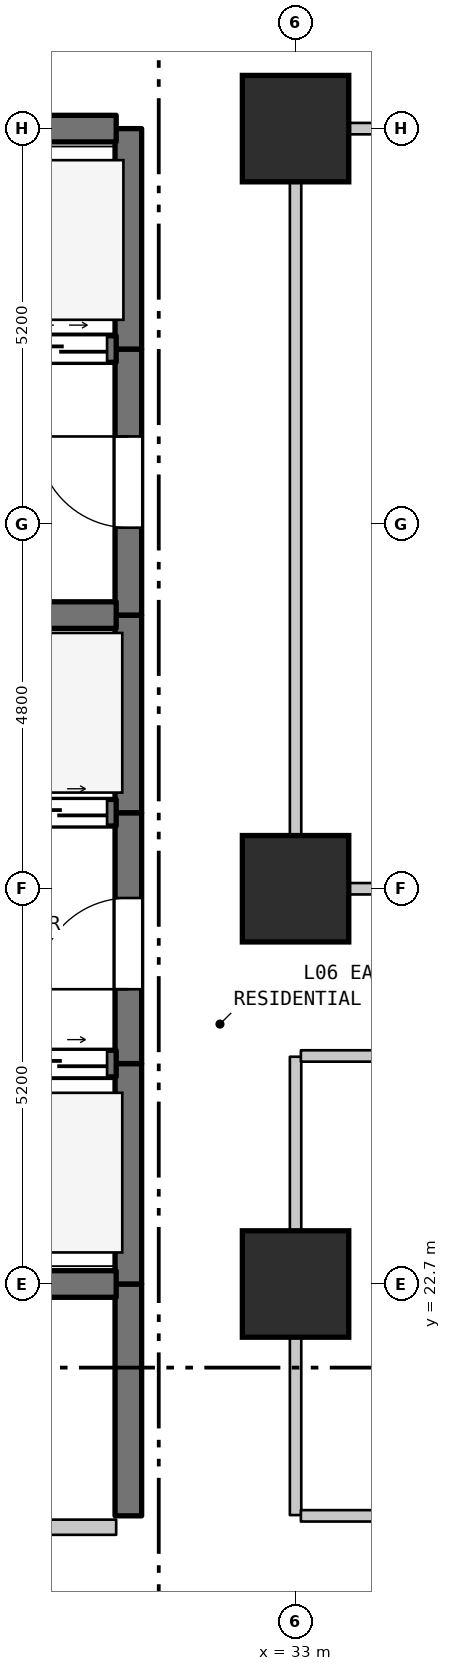
"""IFC4 building model, lengths in metres.
Left out: names, types, materials, properties, quantities, classifications, styles, units other than length and angle.
Written with IfcOpenShell. Run it as: python <this file> out.ifc"""

import sys

from ifc_helpers import new_model, si_unit, direction, frame, frame_2d, origin, origin_2d, place, context, subcontext, project, spatial, rectangle, extrude, element, fill, save


model = new_model("IFC4")
c1 = context("Model", 3, precision=1e-05, world=origin(), true_north=direction((0.0, 1.0)))
c2 = subcontext(c1, "Body", "Model", "MODEL_VIEW")
j1 = project(units=[si_unit("LENGTHUNIT", "METRE"), si_unit("PLANEANGLEUNIT", "RADIAN")], contexts=[c1])
p1 = place(None, origin())
s1 = spatial("IfcSite", under=j1, at=p1, CompositionType="ELEMENT")
p2 = place(p1, origin())
s2 = spatial("IfcBuilding", under=s1, at=p2, CompositionType="ELEMENT")
p3 = place(p2, frame((0.0, 0.0, 31.4)))
s3 = spatial("IfcBuildingStorey", under=s2, at=p3, CompositionType="ELEMENT", Elevation=31.4)
for number, where, z_axis, x_axis in (
    (1, (33.0, 22.7, 0.0), (0.0, 0.0, 1.0), (1.0, 0.0, 0.0)),
    (2, (33.0, 27.9, 0.0), (0.0, 0.0, 1.0), (1.0, 0.0, 0.0)),
    (3, (33.0, 37.9, 0.0), (0.0, 0.0, 1.0), (1.0, 0.0, 0.0)),
):
    element("IfcColumn", number, at=place(p3, frame(where, z_axis=z_axis, x_axis=x_axis)), inside=s3, PredefinedType="COLUMN", context=c2, shape_type="SweptSolid", body=[
        extrude(rectangle(XDim=1.4, YDim=1.4, at=origin_2d()), origin(), (0.0, 0.0, 1.0), 3.7),
    ])
p4 = place(p3, frame((30.8, 19.65, 0.0), z_axis=(0.0, 0.0, 1.0), x_axis=(0.0, 1.0, 0.0)))
e4 = element("IfcWall", 4, at=p4, inside=s3, PredefinedType="SHEAR", context=c2, shape_type="SweptSolid", body=[
    extrude(rectangle(XDim=3.05, YDim=0.35, at=frame_2d((1.525, 0.0))), origin(), (0.0, 0.0, 1.0), 3.385),
])
p5 = place(p3, frame((30.8, 22.7, 0.0), z_axis=(0.0, 0.0, 1.0), x_axis=(0.0, 1.0, 0.0)))
e5 = element("IfcWall", 5, at=p5, inside=s3, PredefinedType="SHEAR", context=c2, shape_type="SweptSolid", body=[
    extrude(rectangle(XDim=2.9, YDim=0.35, at=frame_2d((1.45, 0.0))), origin(), (0.0, 0.0, 1.0), 3.385),
])
p6 = place(p3, frame((30.8, 25.6, 0.0), z_axis=(0.0, 0.0, 1.0), x_axis=(0.0, 1.0, 0.0)))
e6 = element("IfcWall", 6, at=p6, inside=s3, PredefinedType="SHEAR", context=c2, shape_type="SweptSolid", body=[
    extrude(rectangle(XDim=3.3, YDim=0.35, at=frame_2d((1.65, 0.0))), origin(), (0.0, 0.0, 1.0), 3.385),
])
p7 = place(p6, frame((0.978, 0.0, 0.0)))
e7 = element("IfcOpeningElement", 7, at=p7, cuts=e6, PredefinedType="OPENING", context=c2, shape_type="SweptSolid", body=[
    extrude(rectangle(XDim=1.2, YDim=2.2, at=frame_2d((0.6, 1.1))), frame((0.0, 0.185, 0.0), z_axis=(0.0, -1.0, 0.0), x_axis=(1.0, 0.0, 0.0)), (0.0, 0.0, 1.0), 0.37),
])
p8 = place(p3, frame((30.8, 28.9, 0.0), z_axis=(0.0, 0.0, 1.0), x_axis=(0.0, 1.0, 0.0)))
e8 = element("IfcWall", 8, at=p8, inside=s3, PredefinedType="SHEAR", context=c2, shape_type="SweptSolid", body=[
    extrude(rectangle(XDim=2.6, YDim=0.35, at=frame_2d((1.3, 0.0))), origin(), (0.0, 0.0, 1.0), 3.385),
])
p9 = place(p3, frame((30.8, 31.5, 0.0), z_axis=(0.0, 0.0, 1.0), x_axis=(0.0, 1.0, 0.0)))
e9 = element("IfcWall", 9, at=p9, inside=s3, PredefinedType="SHEAR", context=c2, shape_type="SweptSolid", body=[
    extrude(rectangle(XDim=3.5, YDim=0.35, at=frame_2d((1.75, 0.0))), origin(), (0.0, 0.0, 1.0), 3.385),
])
p10 = place(p9, frame((1.15, 0.0, 0.0)))
e10 = element("IfcOpeningElement", 10, at=p10, cuts=e9, PredefinedType="OPENING", context=c2, shape_type="SweptSolid", body=[
    extrude(rectangle(XDim=1.2, YDim=2.2, at=frame_2d((0.6, 1.1))), frame((0.0, 0.185, 0.0), z_axis=(0.0, -1.0, 0.0), x_axis=(1.0, 0.0, 0.0)), (0.0, 0.0, 1.0), 0.37),
])
p11 = place(p3, frame((30.8, 35.0, 0.0), z_axis=(0.0, 0.0, 1.0), x_axis=(0.0, 1.0, 0.0)))
e11 = element("IfcWall", 11, at=p11, inside=s3, PredefinedType="SHEAR", context=c2, shape_type="SweptSolid", body=[
    extrude(rectangle(XDim=2.9, YDim=0.35, at=frame_2d((1.45, 0.0))), origin(), (0.0, 0.0, 1.0), 3.385),
])
p12 = place(p3, frame((33.0, 19.66, 0.0), z_axis=(0.0, 0.0, 1.0), x_axis=(0.0, 1.0, 0.0)))
e12 = element("IfcWall", 12, at=p12, inside=s3, PredefinedType="STANDARD", context=c2, shape_type="SweptSolid", body=[
    extrude(rectangle(XDim=6.03, YDim=0.15, at=frame_2d((3.015, 0.0))), origin(), (0.0, 0.0, 1.0), 2.885),
])
p13 = place(p3, frame((33.0, 27.91, 0.0), z_axis=(0.0, 0.0, 1.0), x_axis=(0.0, 1.0, 0.0)))
e13 = element("IfcWall", 13, at=p13, inside=s3, PredefinedType="STANDARD", context=c2, shape_type="SweptSolid", body=[
    extrude(rectangle(XDim=9.98, YDim=0.15, at=frame_2d((4.99, 0.0))), origin(), (0.0, 0.0, 1.0), 2.885),
])
p14 = place(p3, frame((25.985, 19.5, 0.0), z_axis=(0.0, 0.0, 1.0), x_axis=(1.0, 0.0, 0.0)))
e14 = element("IfcWall", 14, at=p14, inside=s3, PredefinedType="STANDARD", context=c2, shape_type="SweptSolid", body=[
    extrude(rectangle(XDim=4.655, YDim=0.2, at=frame_2d((2.327, 0.0))), origin(), (0.0, 0.0, 1.0), 3.385),
])
p15 = place(p14, frame((1.845, 0.0, 0.0)))
e15 = element("IfcOpeningElement", 15, at=p15, cuts=e14, PredefinedType="OPENING", context=c2, shape_type="SweptSolid", body=[
    extrude(rectangle(XDim=0.9, YDim=2.15, at=frame_2d((0.45, 1.075))), frame((0.0, 0.11, 0.0), z_axis=(0.0, -1.0, 0.0), x_axis=(1.0, 0.0, 0.0)), (0.0, 0.0, 1.0), 0.22),
])
p16 = place(p3, frame((33.07, 19.65, 0.0), z_axis=(0.0, 0.0, 1.0), x_axis=(1.0, 0.0, 0.0)))
e16 = element("IfcWall", 16, at=p16, inside=s3, PredefinedType="STANDARD", context=c2, shape_type="SweptSolid", body=[
    extrude(rectangle(XDim=33.27, YDim=0.15, at=frame_2d((16.635, 0.0))), origin(), (0.0, 0.0, 1.0), 3.385),
])
p17 = place(p16, frame((16.065, 0.0, 0.0)))
e17 = element("IfcOpeningElement", 17, at=p17, cuts=e16, PredefinedType="OPENING", context=c2, shape_type="SweptSolid", body=[
    extrude(rectangle(XDim=1.0, YDim=2.15, at=frame_2d((0.5, 1.075))), frame((0.0, 0.085, 0.0), z_axis=(0.0, -1.0, 0.0), x_axis=(1.0, 0.0, 0.0)), (0.0, 0.0, 1.0), 0.17),
])
p18 = place(p3, frame((27.46, 22.7, 0.0), z_axis=(0.0, 0.0, 1.0), x_axis=(1.0, 0.0, 0.0)))
e18 = element("IfcWall", 18, at=p18, inside=s3, PredefinedType="SHEAR", context=c2, shape_type="SweptSolid", body=[
    extrude(rectangle(XDim=3.18, YDim=0.35, at=frame_2d((1.59, 0.0))), origin(), (0.0, 0.0, 1.0), 3.385),
])
p19 = place(p3, frame((27.46, 25.6, 0.0), z_axis=(0.0, 0.0, 1.0), x_axis=(1.0, 0.0, 0.0)))
e19 = element("IfcWall", 19, at=p19, inside=s3, PredefinedType="SHEAR", context=c2, shape_type="SweptSolid", body=[
    extrude(rectangle(XDim=3.18, YDim=0.35, at=frame_2d((1.59, 0.0))), origin(), (0.0, 0.0, 1.0), 3.385),
])
p20 = place(p19, frame((0.12, 0.0, 0.0)))
e20 = element("IfcOpeningElement", 20, at=p20, cuts=e19, PredefinedType="OPENING", context=c2, shape_type="SweptSolid", body=[
    extrude(rectangle(XDim=1.25, YDim=2.2, at=frame_2d((0.625, 1.1))), frame((0.0, 0.185, 0.0), z_axis=(0.0, -1.0, 0.0), x_axis=(1.0, 0.0, 0.0)), (0.0, 0.0, 1.0), 0.37),
])
p21 = place(p19, frame((1.81, 0.0, 0.0)))
e21 = element("IfcOpeningElement", 21, at=p21, cuts=e19, PredefinedType="OPENING", context=c2, shape_type="SweptSolid", body=[
    extrude(rectangle(XDim=1.25, YDim=2.2, at=frame_2d((0.625, 1.1))), frame((0.0, 0.185, 0.0), z_axis=(0.0, -1.0, 0.0), x_axis=(1.0, 0.0, 0.0)), (0.0, 0.0, 1.0), 0.37),
])
p22 = place(p3, frame((33.07, 25.7, 0.0), z_axis=(0.0, 0.0, 1.0), x_axis=(1.0, 0.0, 0.0)))
e22 = element("IfcWall", 22, at=p22, inside=s3, PredefinedType="STANDARD", context=c2, shape_type="SweptSolid", body=[
    extrude(rectangle(XDim=30.87, YDim=0.15, at=frame_2d((15.435, 0.0))), origin(), (0.0, 0.0, 1.0), 3.385),
])
p23 = place(p3, frame((33.07, 27.9, 0.0), z_axis=(0.0, 0.0, 1.0), x_axis=(1.0, 0.0, 0.0)))
e23 = element("IfcWall", 23, at=p23, inside=s3, PredefinedType="STANDARD", context=c2, shape_type="SweptSolid", body=[
    extrude(rectangle(XDim=30.87, YDim=0.15, at=frame_2d((15.435, 0.0))), origin(), (0.0, 0.0, 1.0), 2.885),
])
p24 = place(p23, frame((14.935, 0.0, 0.0)))
e24 = element("IfcOpeningElement", 24, at=p24, cuts=e23, PredefinedType="OPENING", context=c2, shape_type="SweptSolid", body=[
    extrude(rectangle(XDim=1.0, YDim=2.15, at=frame_2d((0.5, 1.075))), frame((0.0, 0.085, 0.0), z_axis=(0.0, -1.0, 0.0), x_axis=(1.0, 0.0, 0.0)), (0.0, 0.0, 1.0), 0.17),
])
p25 = place(p3, frame((27.46, 28.9, 0.0), z_axis=(0.0, 0.0, 1.0), x_axis=(1.0, 0.0, 0.0)))
e25 = element("IfcWall", 25, at=p25, inside=s3, PredefinedType="SHEAR", context=c2, shape_type="SweptSolid", body=[
    extrude(rectangle(XDim=3.18, YDim=0.35, at=frame_2d((1.59, 0.0))), origin(), (0.0, 0.0, 1.0), 3.385),
])
p26 = place(p25, frame((0.12, 0.0, 0.0)))
e26 = element("IfcOpeningElement", 26, at=p26, cuts=e25, PredefinedType="OPENING", context=c2, shape_type="SweptSolid", body=[
    extrude(rectangle(XDim=1.25, YDim=2.2, at=frame_2d((0.625, 1.1))), frame((0.0, 0.185, 0.0), z_axis=(0.0, -1.0, 0.0), x_axis=(1.0, 0.0, 0.0)), (0.0, 0.0, 1.0), 0.37),
])
p27 = place(p25, frame((1.81, 0.0, 0.0)))
e27 = element("IfcOpeningElement", 27, at=p27, cuts=e25, PredefinedType="OPENING", context=c2, shape_type="SweptSolid", body=[
    extrude(rectangle(XDim=1.25, YDim=2.2, at=frame_2d((0.625, 1.1))), frame((0.0, 0.185, 0.0), z_axis=(0.0, -1.0, 0.0), x_axis=(1.0, 0.0, 0.0)), (0.0, 0.0, 1.0), 0.37),
])
p28 = place(p3, frame((27.46, 31.5, 0.0), z_axis=(0.0, 0.0, 1.0), x_axis=(1.0, 0.0, 0.0)))
e28 = element("IfcWall", 28, at=p28, inside=s3, PredefinedType="SHEAR", context=c2, shape_type="SweptSolid", body=[
    extrude(rectangle(XDim=3.18, YDim=0.35, at=frame_2d((1.59, 0.0))), origin(), (0.0, 0.0, 1.0), 3.385),
])
p29 = place(p3, frame((19.16, 35.0, 0.0), z_axis=(0.0, 0.0, 1.0), x_axis=(1.0, 0.0, 0.0)))
e29 = element("IfcWall", 29, at=p29, inside=s3, PredefinedType="SHEAR", context=c2, shape_type="SweptSolid", body=[
    extrude(rectangle(XDim=11.48, YDim=0.35, at=frame_2d((5.74, 0.0))), origin(), (0.0, 0.0, 1.0), 3.385),
])
p30 = place(p29, frame((0.365, 0.0, 0.0)))
e30 = element("IfcOpeningElement", 30, at=p30, cuts=e29, PredefinedType="OPENING", context=c2, shape_type="SweptSolid", body=[
    extrude(rectangle(XDim=1.35, YDim=2.2, at=frame_2d((0.675, 1.1))), frame((0.0, 0.185, 0.0), z_axis=(0.0, -1.0, 0.0), x_axis=(1.0, 0.0, 0.0)), (0.0, 0.0, 1.0), 0.37),
])
p31 = place(p29, frame((2.765, 0.0, 0.0)))
e31 = element("IfcOpeningElement", 31, at=p31, cuts=e29, PredefinedType="OPENING", context=c2, shape_type="SweptSolid", body=[
    extrude(rectangle(XDim=1.35, YDim=2.2, at=frame_2d((0.675, 1.1))), frame((0.0, 0.185, 0.0), z_axis=(0.0, -1.0, 0.0), x_axis=(1.0, 0.0, 0.0)), (0.0, 0.0, 1.0), 0.37),
])
p32 = place(p29, frame((4.915, 0.0, 0.0)))
e32 = element("IfcOpeningElement", 32, at=p32, cuts=e29, PredefinedType="OPENING", context=c2, shape_type="SweptSolid", body=[
    extrude(rectangle(XDim=1.2, YDim=2.2, at=frame_2d((0.6, 1.1))), frame((0.0, 0.185, 0.0), z_axis=(0.0, -1.0, 0.0), x_axis=(1.0, 0.0, 0.0)), (0.0, 0.0, 1.0), 0.37),
])
p33 = place(p29, frame((6.665, 0.0, 0.0)))
e33 = element("IfcOpeningElement", 33, at=p33, cuts=e29, PredefinedType="OPENING", context=c2, shape_type="SweptSolid", body=[
    extrude(rectangle(XDim=1.2, YDim=2.2, at=frame_2d((0.6, 1.1))), frame((0.0, 0.185, 0.0), z_axis=(0.0, -1.0, 0.0), x_axis=(1.0, 0.0, 0.0)), (0.0, 0.0, 1.0), 0.37),
])
p34 = place(p29, frame((8.415, 0.0, 0.0)))
e34 = element("IfcOpeningElement", 34, at=p34, cuts=e29, PredefinedType="OPENING", context=c2, shape_type="SweptSolid", body=[
    extrude(rectangle(XDim=1.2, YDim=2.2, at=frame_2d((0.6, 1.1))), frame((0.0, 0.185, 0.0), z_axis=(0.0, -1.0, 0.0), x_axis=(1.0, 0.0, 0.0)), (0.0, 0.0, 1.0), 0.37),
])
p35 = place(p29, frame((10.16, 0.0, 0.0)))
e35 = element("IfcOpeningElement", 35, at=p35, cuts=e29, PredefinedType="OPENING", context=c2, shape_type="SweptSolid", body=[
    extrude(rectangle(XDim=1.2, YDim=2.2, at=frame_2d((0.6, 1.1))), frame((0.0, 0.185, 0.0), z_axis=(0.0, -1.0, 0.0), x_axis=(1.0, 0.0, 0.0)), (0.0, 0.0, 1.0), 0.37),
])
p36 = place(p3, frame((19.16, 37.9, 0.0), z_axis=(0.0, 0.0, 1.0), x_axis=(1.0, 0.0, 0.0)))
e36 = element("IfcWall", 36, at=p36, inside=s3, PredefinedType="SHEAR", context=c2, shape_type="SweptSolid", body=[
    extrude(rectangle(XDim=11.48, YDim=0.35, at=frame_2d((5.74, 0.0))), origin(), (0.0, 0.0, 1.0), 3.385),
])
p37 = place(p3, frame((33.07, 37.9, 0.0), z_axis=(0.0, 0.0, 1.0), x_axis=(1.0, 0.0, 0.0)))
e37 = element("IfcWall", 37, at=p37, inside=s3, PredefinedType="STANDARD", context=c2, shape_type="SweptSolid", body=[
    extrude(rectangle(XDim=26.935, YDim=0.15, at=frame_2d((13.467, 0.0))), origin(), (0.0, 0.0, 1.0), 3.385),
])
p38 = place(p7, origin())
e38 = element("IfcDoor", 38, at=p38, inside=s3, OperationType="SINGLE_SWING_LEFT", PredefinedType="DOOR", context=c2, shape_type="SweptSolid", body=[
    extrude(rectangle(XDim=1.2, YDim=2.2, at=frame_2d((0.6, 1.1))), frame((0.0, 0.025, 0.0), z_axis=(0.0, -1.0, 0.0), x_axis=(1.0, 0.0, 0.0)), (0.0, 0.0, 1.0), 0.05),
])
fill(e7, e38)
p39 = place(p10, origin())
e39 = element("IfcDoor", 39, at=p39, inside=s3, OperationType="SINGLE_SWING_RIGHT", PredefinedType="DOOR", context=c2, shape_type="SweptSolid", body=[
    extrude(rectangle(XDim=1.2, YDim=2.2, at=frame_2d((0.6, 1.1))), frame((0.0, 0.025, 0.0), z_axis=(0.0, -1.0, 0.0), x_axis=(1.0, 0.0, 0.0)), (0.0, 0.0, 1.0), 0.05),
])
fill(e10, e39)
p40 = place(p21, origin())
e40 = element("IfcDoor", 40, at=p40, inside=s3, OperationType="DOUBLE_DOOR_SLIDING", PredefinedType="DOOR", context=c2, shape_type="SweptSolid", body=[
    extrude(rectangle(XDim=1.25, YDim=2.2, at=frame_2d((0.625, 1.1))), frame((0.0, 0.025, 0.0), z_axis=(0.0, -1.0, 0.0), x_axis=(1.0, 0.0, 0.0)), (0.0, 0.0, 1.0), 0.05),
])
fill(e21, e40)
p41 = place(p27, origin())
e41 = element("IfcDoor", 41, at=p41, inside=s3, OperationType="DOUBLE_DOOR_SLIDING", PredefinedType="DOOR", context=c2, shape_type="SweptSolid", body=[
    extrude(rectangle(XDim=1.25, YDim=2.2, at=frame_2d((0.625, 1.1))), frame((0.0, 0.025, 0.0), z_axis=(0.0, -1.0, 0.0), x_axis=(1.0, 0.0, 0.0)), (0.0, 0.0, 1.0), 0.05),
])
fill(e27, e41)
p42 = place(p35, origin())
e42 = element("IfcDoor", 42, at=p42, inside=s3, OperationType="DOUBLE_DOOR_SLIDING", PredefinedType="DOOR", context=c2, shape_type="SweptSolid", body=[
    extrude(rectangle(XDim=1.2, YDim=2.2, at=frame_2d((0.6, 1.1))), frame((0.0, 0.025, 0.0), z_axis=(0.0, -1.0, 0.0), x_axis=(1.0, 0.0, 0.0)), (0.0, 0.0, 1.0), 0.05),
])
fill(e35, e42)
save(model, sys.argv[1])
